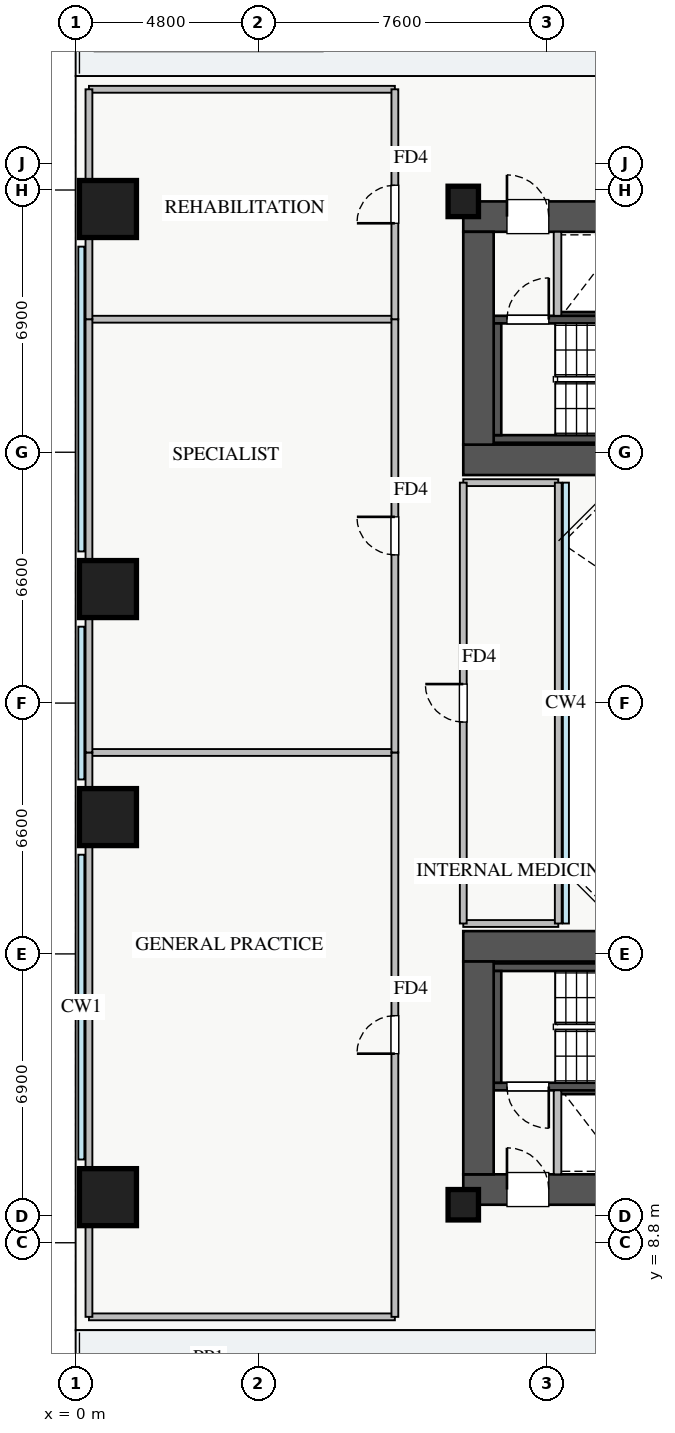
"""IFC4 building model, lengths in metres.
Left out: names, types, materials, properties, quantities, classifications, styles, units other than length and angle.
Written with IfcOpenShell. Run it as: python <this file> out.ifc"""

import sys

from ifc_helpers import new_model, si_unit, direction, frame, frame_2d, origin, origin_2d, place, context, subcontext, project, spatial, rectangle, extrude, source, transform, mapped, element, fill, save


model = new_model("IFC4")
c1 = context("Model", 3, precision=1e-05, world=origin(), true_north=direction((0.0, 1.0)))
c2 = subcontext(c1, "Body", "Model", "MODEL_VIEW")
j1 = project(units=[si_unit("LENGTHUNIT", "METRE"), si_unit("PLANEANGLEUNIT", "RADIAN")], contexts=[c1])
p1 = place(None, origin())
s1 = spatial("IfcSite", under=j1, at=p1, CompositionType="ELEMENT")
p2 = place(p1, origin())
s2 = spatial("IfcBuilding", under=s1, at=p2, CompositionType="ELEMENT")
p3 = place(p2, frame((0.0, 0.0, 18.2)))
s3 = spatial("IfcBuildingStorey", under=s2, at=p3, CompositionType="ELEMENT", Elevation=18.2)
for number, where, z_axis, x_axis in (
    (1, (12.68, 33.2, 0.0), (0.0, 0.0, 1.0), (1.0, 0.0, 0.0)),
    (2, (12.68, 12.8, 0.0), (0.0, 0.0, 1.0), (1.0, 0.0, 0.0)),
):
    element("IfcWall", number, at=place(p3, frame(where, z_axis=z_axis, x_axis=x_axis)), inside=s3, PredefinedType="SHEAR", context=c2, shape_type="SweptSolid", body=[
        extrude(rectangle(XDim=1.94, YDim=0.18, at=frame_2d((0.97, 0.0))), origin(), (0.0, 0.0, 1.0), 4.62),
    ])
p4 = place(p3, frame((11.0, 29.95, 0.0), z_axis=(0.0, 0.0, 1.0), x_axis=(1.0, 0.0, 0.0)))
e3 = element("IfcWall", 3, at=p4, inside=s3, PredefinedType="SHEAR", context=c2, shape_type="SweptSolid", body=[
    extrude(rectangle(XDim=7.15, YDim=0.2, at=frame_2d((3.575, 0.0))), origin(), (0.0, 0.0, 1.0), 4.8),
])
p5 = place(p3, frame((11.0, 33.09, 0.0), z_axis=(0.0, 0.0, 1.0), x_axis=(1.0, 0.0, 0.0)))
e4 = element("IfcWall", 4, at=p5, inside=s3, PredefinedType="SHEAR", context=c2, shape_type="SweptSolid", body=[
    extrude(rectangle(XDim=7.15, YDim=0.2, at=frame_2d((3.575, 0.0))), origin(), (0.0, 0.0, 1.0), 4.8),
])
p6 = place(p5, frame((0.35, 0.0, 0.0)))
e5 = element("IfcOpeningElement", 5, at=p6, cuts=e4, PredefinedType="OPENING", context=c2, shape_type="SweptSolid", body=[
    extrude(rectangle(XDim=1.1, YDim=2.05, at=frame_2d((0.55, 1.025))), frame((0.0, 0.11, 0.0), z_axis=(0.0, -1.0, 0.0), x_axis=(1.0, 0.0, 0.0)), (0.0, 0.0, 1.0), 0.22),
])
p7 = place(p3, frame((11.1, 30.05, 0.0), z_axis=(0.0, 0.0, 1.0), x_axis=(0.0, 1.0, 0.0)))
e6 = element("IfcWall", 6, at=p7, inside=s3, PredefinedType="SHEAR", context=c2, shape_type="SweptSolid", body=[
    extrude(rectangle(XDim=2.94, YDim=0.2, at=frame_2d((1.47, 0.0))), origin(), (0.0, 0.0, 1.0), 4.8),
])
p8 = place(p3, frame((11.0, 12.91, 0.0), z_axis=(0.0, 0.0, 1.0), x_axis=(1.0, 0.0, 0.0)))
e7 = element("IfcWall", 7, at=p8, inside=s3, PredefinedType="SHEAR", context=c2, shape_type="SweptSolid", body=[
    extrude(rectangle(XDim=7.15, YDim=0.2, at=frame_2d((3.575, 0.0))), origin(), (0.0, 0.0, 1.0), 4.8),
])
p9 = place(p8, frame((0.35, 0.0, 0.0)))
e8 = element("IfcOpeningElement", 8, at=p9, cuts=e7, PredefinedType="OPENING", context=c2, shape_type="SweptSolid", body=[
    extrude(rectangle(XDim=1.1, YDim=2.05, at=frame_2d((0.55, 1.025))), frame((0.0, 0.11, 0.0), z_axis=(0.0, -1.0, 0.0), x_axis=(1.0, 0.0, 0.0)), (0.0, 0.0, 1.0), 0.22),
])
p10 = place(p3, frame((11.0, 16.05, 0.0), z_axis=(0.0, 0.0, 1.0), x_axis=(1.0, 0.0, 0.0)))
e9 = element("IfcWall", 9, at=p10, inside=s3, PredefinedType="SHEAR", context=c2, shape_type="SweptSolid", body=[
    extrude(rectangle(XDim=7.15, YDim=0.2, at=frame_2d((3.575, 0.0))), origin(), (0.0, 0.0, 1.0), 4.8),
])
p11 = place(p3, frame((11.1, 13.01, 0.0), z_axis=(0.0, 0.0, 1.0), x_axis=(0.0, 1.0, 0.0)))
e10 = element("IfcWall", 10, at=p11, inside=s3, PredefinedType="SHEAR", context=c2, shape_type="SweptSolid", body=[
    extrude(rectangle(XDim=2.94, YDim=0.2, at=frame_2d((1.47, 0.0))), origin(), (0.0, 0.0, 1.0), 4.8),
])
p12 = place(p3, frame((10.2, 29.4, 0.0), z_axis=(0.0, 0.0, 1.0), x_axis=(1.0, 0.0, 0.0)))
e11 = element("IfcWall", 11, at=p12, inside=s3, PredefinedType="SHEAR", context=c2, shape_type="SweptSolid", body=[
    extrude(rectangle(XDim=17.6, YDim=0.8, at=frame_2d((8.8, 0.0))), origin(), (0.0, 0.0, 1.0), 4.8),
])
p13 = place(p3, frame((10.2, 35.8, 0.0), z_axis=(0.0, 0.0, 1.0), x_axis=(1.0, 0.0, 0.0)))
e12 = element("IfcWall", 12, at=p13, inside=s3, PredefinedType="SHEAR", context=c2, shape_type="SweptSolid", body=[
    extrude(rectangle(XDim=17.6, YDim=0.8, at=frame_2d((8.8, 0.0))), origin(), (0.0, 0.0, 1.0), 4.8),
])
p14 = place(p13, frame((1.15, 0.0, 0.0)))
e13 = element("IfcOpeningElement", 13, at=p14, cuts=e12, PredefinedType="OPENING", context=c2, shape_type="SweptSolid", body=[
    extrude(rectangle(XDim=1.1, YDim=2.05, at=frame_2d((0.55, 1.025))), frame((0.0, 0.41, 0.0), z_axis=(0.0, -1.0, 0.0), x_axis=(1.0, 0.0, 0.0)), (0.0, 0.0, 1.0), 0.82),
])
p15 = place(p13, frame((8.3, 0.0, 0.0)))
e14 = element("IfcOpeningElement", 14, at=p15, cuts=e12, PredefinedType="OPENING", context=c2, shape_type="SweptSolid", body=[
    extrude(rectangle(XDim=1.1, YDim=2.05, at=frame_2d((0.55, 1.025))), frame((0.0, 0.41, 0.0), z_axis=(0.0, -1.0, 0.0), x_axis=(1.0, 0.0, 0.0)), (0.0, 0.0, 1.0), 0.82),
])
p16 = place(p13, frame((10.05, 0.0, 0.0)))
e15 = element("IfcOpeningElement", 15, at=p16, cuts=e12, PredefinedType="OPENING", context=c2, shape_type="SweptSolid", body=[
    extrude(rectangle(XDim=1.1, YDim=2.05, at=frame_2d((0.55, 1.025))), frame((0.0, 0.41, 0.0), z_axis=(0.0, -1.0, 0.0), x_axis=(1.0, 0.0, 0.0)), (0.0, 0.0, 1.0), 0.82),
])
p17 = place(p13, frame((14.74, 0.0, 0.0)))
e16 = element("IfcOpeningElement", 16, at=p17, cuts=e12, PredefinedType="OPENING", context=c2, shape_type="SweptSolid", body=[
    extrude(rectangle(XDim=1.0, YDim=2.05, at=frame_2d((0.5, 1.025))), frame((0.0, 0.41, 0.0), z_axis=(0.0, -1.0, 0.0), x_axis=(1.0, 0.0, 0.0)), (0.0, 0.0, 1.0), 0.82),
])
p18 = place(p13, frame((11.835, 0.0, 0.0)))
e17 = element("IfcOpeningElement", 17, at=p18, cuts=e12, PredefinedType="OPENING", context=c2, shape_type="SweptSolid", body=[
    extrude(rectangle(XDim=1.0, YDim=2.05, at=frame_2d((0.5, 1.025))), frame((0.0, 0.41, 0.0), z_axis=(0.0, -1.0, 0.0), x_axis=(1.0, 0.0, 0.0)), (0.0, 0.0, 1.0), 0.82),
])
p19 = place(p13, frame((13.37, 0.0, 0.0)))
e18 = element("IfcOpeningElement", 18, at=p19, cuts=e12, PredefinedType="OPENING", context=c2, shape_type="SweptSolid", body=[
    extrude(rectangle(XDim=1.0, YDim=2.05, at=frame_2d((0.5, 1.025))), frame((0.0, 0.41, 0.0), z_axis=(0.0, -1.0, 0.0), x_axis=(1.0, 0.0, 0.0)), (0.0, 0.0, 1.0), 0.82),
])
p20 = place(p3, frame((10.6, 29.8, 0.0), z_axis=(0.0, 0.0, 1.0), x_axis=(0.0, 1.0, 0.0)))
e19 = element("IfcWall", 19, at=p20, inside=s3, PredefinedType="SHEAR", context=c2, shape_type="SweptSolid", body=[
    extrude(rectangle(XDim=5.6, YDim=0.8, at=frame_2d((2.8, 0.0))), origin(), (0.0, 0.0, 1.0), 4.8),
])
p21 = place(p3, frame((10.2, 10.2, 0.0), z_axis=(0.0, 0.0, 1.0), x_axis=(1.0, 0.0, 0.0)))
e20 = element("IfcWall", 20, at=p21, inside=s3, PredefinedType="SHEAR", context=c2, shape_type="SweptSolid", body=[
    extrude(rectangle(XDim=17.6, YDim=0.8, at=frame_2d((8.8, 0.0))), origin(), (0.0, 0.0, 1.0), 4.8),
])
p22 = place(p21, frame((1.15, 0.0, 0.0)))
e21 = element("IfcOpeningElement", 21, at=p22, cuts=e20, PredefinedType="OPENING", context=c2, shape_type="SweptSolid", body=[
    extrude(rectangle(XDim=1.1, YDim=2.05, at=frame_2d((0.55, 1.025))), frame((0.0, 0.41, 0.0), z_axis=(0.0, -1.0, 0.0), x_axis=(1.0, 0.0, 0.0)), (0.0, 0.0, 1.0), 0.82),
])
p23 = place(p21, frame((8.3, 0.0, 0.0)))
e22 = element("IfcOpeningElement", 22, at=p23, cuts=e20, PredefinedType="OPENING", context=c2, shape_type="SweptSolid", body=[
    extrude(rectangle(XDim=1.1, YDim=2.05, at=frame_2d((0.55, 1.025))), frame((0.0, 0.41, 0.0), z_axis=(0.0, -1.0, 0.0), x_axis=(1.0, 0.0, 0.0)), (0.0, 0.0, 1.0), 0.82),
])
p24 = place(p21, frame((10.05, 0.0, 0.0)))
e23 = element("IfcOpeningElement", 23, at=p24, cuts=e20, PredefinedType="OPENING", context=c2, shape_type="SweptSolid", body=[
    extrude(rectangle(XDim=1.1, YDim=2.05, at=frame_2d((0.55, 1.025))), frame((0.0, 0.41, 0.0), z_axis=(0.0, -1.0, 0.0), x_axis=(1.0, 0.0, 0.0)), (0.0, 0.0, 1.0), 0.82),
])
p25 = place(p21, frame((14.74, 0.0, 0.0)))
e24 = element("IfcOpeningElement", 24, at=p25, cuts=e20, PredefinedType="OPENING", context=c2, shape_type="SweptSolid", body=[
    extrude(rectangle(XDim=1.0, YDim=2.05, at=frame_2d((0.5, 1.025))), frame((0.0, 0.41, 0.0), z_axis=(0.0, -1.0, 0.0), x_axis=(1.0, 0.0, 0.0)), (0.0, 0.0, 1.0), 0.82),
])
p26 = place(p21, frame((12.585, 0.0, 0.0)))
e25 = element("IfcOpeningElement", 25, at=p26, cuts=e20, PredefinedType="OPENING", context=c2, shape_type="SweptSolid", body=[
    extrude(rectangle(XDim=1.0, YDim=2.05, at=frame_2d((0.5, 1.025))), frame((0.0, 0.41, 0.0), z_axis=(0.0, -1.0, 0.0), x_axis=(1.0, 0.0, 0.0)), (0.0, 0.0, 1.0), 0.82),
])
p27 = place(p3, frame((10.2, 16.6, 0.0), z_axis=(0.0, 0.0, 1.0), x_axis=(1.0, 0.0, 0.0)))
e26 = element("IfcWall", 26, at=p27, inside=s3, PredefinedType="SHEAR", context=c2, shape_type="SweptSolid", body=[
    extrude(rectangle(XDim=17.6, YDim=0.8, at=frame_2d((8.8, 0.0))), origin(), (0.0, 0.0, 1.0), 4.8),
])
p28 = place(p3, frame((10.6, 10.6, 0.0), z_axis=(0.0, 0.0, 1.0), x_axis=(0.0, 1.0, 0.0)))
e27 = element("IfcWall", 27, at=p28, inside=s3, PredefinedType="SHEAR", context=c2, shape_type="SweptSolid", body=[
    extrude(rectangle(XDim=5.6, YDim=0.8, at=frame_2d((2.8, 0.0))), origin(), (0.0, 0.0, 1.0), 4.8),
])
m1 = source(origin(), c2, "Body", "SweptSolid", [
    extrude(rectangle(XDim=1.5, YDim=1.5, at=origin_2d()), origin(), (0.0, 0.0, 1.0), 4.8),
])
for number, where, z_axis, x_axis in (
    (28, (0.85, 36.0, 0.0), (0.0, 0.0, 1.0), (1.0, 0.0, 0.0)),
    (29, (0.85, 26.0, 0.0), (0.0, 0.0, 1.0), (1.0, 0.0, 0.0)),
    (30, (0.85, 20.0, 0.0), (0.0, 0.0, 1.0), (1.0, 0.0, 0.0)),
    (31, (0.85, 10.0, 0.0), (0.0, 0.0, 1.0), (1.0, 0.0, 0.0)),
):
    element("IfcColumn", number, at=place(p3, frame(where, z_axis=z_axis, x_axis=x_axis)), inside=s3, PredefinedType="COLUMN", context=c2, shape_type="MappedRepresentation", body=[
        mapped(m1, transform((0.0, 0.0, 0.0), x_axis=(1.0, 0.0, 0.0), y_axis=(0.0, 1.0, 0.0), z_axis=(0.0, 0.0, 1.0), scale=1.0)),
    ])
m2 = source(origin(), c2, "Body", "SweptSolid", [
    extrude(rectangle(XDim=0.8, YDim=0.8, at=origin_2d()), origin(), (0.0, 0.0, 1.0), 4.8),
])
for number, where, z_axis, x_axis in (
    (32, (10.2, 36.2, 0.0), (0.0, 0.0, 1.0), (1.0, 0.0, 0.0)),
    (33, (10.2, 9.8, 0.0), (0.0, 0.0, 1.0), (1.0, 0.0, 0.0)),
):
    element("IfcColumn", number, at=place(p3, frame(where, z_axis=z_axis, x_axis=x_axis)), inside=s3, PredefinedType="PILASTER", context=c2, shape_type="MappedRepresentation", body=[
        mapped(m2, transform((0.0, 0.0, 0.0), x_axis=(1.0, 0.0, 0.0), y_axis=(0.0, 1.0, 0.0), z_axis=(0.0, 0.0, 1.0), scale=1.0)),
    ])
for number, where, z_axis, x_axis in (
    (34, (12.68, 33.19, 0.0), (0.0, 0.0, 1.0), (0.0, 1.0, 0.0)),
    (35, (12.68, 10.6, 0.0), (0.0, 0.0, 1.0), (0.0, 1.0, 0.0)),
):
    element("IfcWall", number, at=place(p3, frame(where, z_axis=z_axis, x_axis=x_axis)), inside=s3, PredefinedType="PARTITIONING", context=c2, shape_type="SweptSolid", body=[
        extrude(rectangle(XDim=2.21, YDim=0.2, at=frame_2d((1.105, 0.0))), origin(), (0.0, 0.0, 1.0), 4.62),
    ])
for number, where, z_axis, x_axis in (
    (36, (0.35, 6.85, 0.0), (0.0, 0.0, 1.0), (1.0, 0.0, 0.0)),
    (37, (0.35, 21.7, 0.0), (0.0, 0.0, 1.0), (1.0, 0.0, 0.0)),
):
    element("IfcWall", number, at=place(p3, frame(where, z_axis=z_axis, x_axis=x_axis)), inside=s3, PredefinedType="PARTITIONING", context=c2, shape_type="SweptSolid", body=[
        extrude(rectangle(XDim=8.05, YDim=0.18, at=frame_2d((4.025, 0.0))), origin(), (0.0, 0.0, 1.0), 4.62),
    ])
p29 = place(p3, frame((0.35, 6.85, 0.0), z_axis=(0.0, 0.0, 1.0), x_axis=(0.0, 1.0, 0.0)))
e38 = element("IfcWall", 38, at=p29, inside=s3, PredefinedType="PARTITIONING", context=c2, shape_type="SweptSolid", body=[
    extrude(rectangle(XDim=14.85, YDim=0.18, at=frame_2d((7.425, 0.0))), origin(), (0.0, 0.0, 1.0), 4.62),
])
p30 = place(p3, frame((8.4, 6.85, 0.0), z_axis=(0.0, 0.0, 1.0), x_axis=(0.0, 1.0, 0.0)))
e39 = element("IfcWall", 39, at=p30, inside=s3, PredefinedType="PARTITIONING", context=c2, shape_type="SweptSolid", body=[
    extrude(rectangle(XDim=14.85, YDim=0.18, at=frame_2d((7.425, 0.0))), origin(), (0.0, 0.0, 1.0), 4.62),
])
p31 = place(p30, frame((6.925, 0.0, 0.0)))
e40 = element("IfcOpeningElement", 40, at=p31, cuts=e39, PredefinedType="OPENING", context=c2, shape_type="SweptSolid", body=[
    extrude(rectangle(XDim=1.0, YDim=2.05, at=frame_2d((0.5, 1.025))), frame((0.0, 0.1, 0.0), z_axis=(0.0, -1.0, 0.0), x_axis=(1.0, 0.0, 0.0)), (0.0, 0.0, 1.0), 0.2),
])
p32 = place(p3, frame((0.35, 33.1, 0.0), z_axis=(0.0, 0.0, 1.0), x_axis=(1.0, 0.0, 0.0)))
e41 = element("IfcWall", 41, at=p32, inside=s3, PredefinedType="PARTITIONING", context=c2, shape_type="SweptSolid", body=[
    extrude(rectangle(XDim=8.05, YDim=0.18, at=frame_2d((4.025, 0.0))), origin(), (0.0, 0.0, 1.0), 4.62),
])
p33 = place(p3, frame((0.35, 21.7, 0.0), z_axis=(0.0, 0.0, 1.0), x_axis=(0.0, 1.0, 0.0)))
e42 = element("IfcWall", 42, at=p33, inside=s3, PredefinedType="PARTITIONING", context=c2, shape_type="SweptSolid", body=[
    extrude(rectangle(XDim=11.4, YDim=0.18, at=frame_2d((5.7, 0.0))), origin(), (0.0, 0.0, 1.0), 4.62),
])
p34 = place(p3, frame((8.4, 21.7, 0.0), z_axis=(0.0, 0.0, 1.0), x_axis=(0.0, 1.0, 0.0)))
e43 = element("IfcWall", 43, at=p34, inside=s3, PredefinedType="PARTITIONING", context=c2, shape_type="SweptSolid", body=[
    extrude(rectangle(XDim=11.4, YDim=0.18, at=frame_2d((5.7, 0.0))), origin(), (0.0, 0.0, 1.0), 4.62),
])
p35 = place(p34, frame((5.2, 0.0, 0.0)))
e44 = element("IfcOpeningElement", 44, at=p35, cuts=e43, PredefinedType="OPENING", context=c2, shape_type="SweptSolid", body=[
    extrude(rectangle(XDim=1.0, YDim=2.05, at=frame_2d((0.5, 1.025))), frame((0.0, 0.1, 0.0), z_axis=(0.0, -1.0, 0.0), x_axis=(1.0, 0.0, 0.0)), (0.0, 0.0, 1.0), 0.2),
])
p36 = place(p3, frame((0.35, 39.15, 0.0), z_axis=(0.0, 0.0, 1.0), x_axis=(1.0, 0.0, 0.0)))
e45 = element("IfcWall", 45, at=p36, inside=s3, PredefinedType="PARTITIONING", context=c2, shape_type="SweptSolid", body=[
    extrude(rectangle(XDim=8.05, YDim=0.18, at=frame_2d((4.025, 0.0))), origin(), (0.0, 0.0, 1.0), 4.62),
])
p37 = place(p3, frame((0.35, 33.1, 0.0), z_axis=(0.0, 0.0, 1.0), x_axis=(0.0, 1.0, 0.0)))
e46 = element("IfcWall", 46, at=p37, inside=s3, PredefinedType="PARTITIONING", context=c2, shape_type="SweptSolid", body=[
    extrude(rectangle(XDim=6.05, YDim=0.18, at=frame_2d((3.025, 0.0))), origin(), (0.0, 0.0, 1.0), 4.62),
])
p38 = place(p3, frame((8.4, 33.1, 0.0), z_axis=(0.0, 0.0, 1.0), x_axis=(0.0, 1.0, 0.0)))
e47 = element("IfcWall", 47, at=p38, inside=s3, PredefinedType="PARTITIONING", context=c2, shape_type="SweptSolid", body=[
    extrude(rectangle(XDim=6.05, YDim=0.18, at=frame_2d((3.025, 0.0))), origin(), (0.0, 0.0, 1.0), 4.62),
])
p39 = place(p38, frame((2.525, 0.0, 0.0)))
e48 = element("IfcOpeningElement", 48, at=p39, cuts=e47, PredefinedType="OPENING", context=c2, shape_type="SweptSolid", body=[
    extrude(rectangle(XDim=1.0, YDim=2.05, at=frame_2d((0.5, 1.025))), frame((0.0, 0.1, 0.0), z_axis=(0.0, -1.0, 0.0), x_axis=(1.0, 0.0, 0.0)), (0.0, 0.0, 1.0), 0.2),
])
for number, where, z_axis, x_axis in (
    (49, (10.2, 17.2, 0.0), (0.0, 0.0, 1.0), (1.0, 0.0, 0.0)),
    (50, (10.2, 28.8, 0.0), (0.0, 0.0, 1.0), (1.0, 0.0, 0.0)),
):
    element("IfcWall", number, at=place(p3, frame(where, z_axis=z_axis, x_axis=x_axis)), inside=s3, PredefinedType="PARTITIONING", context=c2, shape_type="SweptSolid", body=[
        extrude(rectangle(XDim=2.5, YDim=0.18, at=frame_2d((1.25, 0.0))), origin(), (0.0, 0.0, 1.0), 4.62),
    ])
p40 = place(p3, frame((10.2, 17.2, 0.0), z_axis=(0.0, 0.0, 1.0), x_axis=(0.0, 1.0, 0.0)))
e51 = element("IfcWall", 51, at=p40, inside=s3, PredefinedType="PARTITIONING", context=c2, shape_type="SweptSolid", body=[
    extrude(rectangle(XDim=11.6, YDim=0.18, at=frame_2d((5.8, 0.0))), origin(), (0.0, 0.0, 1.0), 4.62),
])
p41 = place(p40, frame((5.3, 0.0, 0.0)))
e52 = element("IfcOpeningElement", 52, at=p41, cuts=e51, PredefinedType="OPENING", context=c2, shape_type="SweptSolid", body=[
    extrude(rectangle(XDim=1.0, YDim=2.05, at=frame_2d((0.5, 1.025))), frame((0.0, 0.1, 0.0), z_axis=(0.0, -1.0, 0.0), x_axis=(1.0, 0.0, 0.0)), (0.0, 0.0, 1.0), 0.2),
])
p42 = place(p3, frame((12.7, 17.2, 0.0), z_axis=(0.0, 0.0, 1.0), x_axis=(0.0, 1.0, 0.0)))
e53 = element("IfcWall", 53, at=p42, inside=s3, PredefinedType="PARTITIONING", context=c2, shape_type="SweptSolid", body=[
    extrude(rectangle(XDim=11.6, YDim=0.18, at=frame_2d((5.8, 0.0))), origin(), (0.0, 0.0, 1.0), 4.62),
])
m3 = source(origin(), c2, "Body", "SweptSolid", [
    extrude(rectangle(XDim=1.1, YDim=2.05, at=frame_2d((0.55, 1.025))), frame((0.0, 0.025, 0.0), z_axis=(0.0, -1.0, 0.0), x_axis=(1.0, 0.0, 0.0)), (0.0, 0.0, 1.0), 0.05),
])
p43 = place(p14, origin())
e54 = element("IfcDoor", 54, at=p43, inside=s3, OperationType="SINGLE_SWING_LEFT", PredefinedType="DOOR", context=c2, shape_type="MappedRepresentation", body=[
    mapped(m3, transform((0.0, 0.0, 0.0), x_axis=(1.0, 0.0, 0.0), y_axis=(0.0, 1.0, 0.0), z_axis=(0.0, 0.0, 1.0), scale=1.0)),
])
fill(e13, e54)
p44 = place(p6, origin())
e55 = element("IfcDoor", 55, at=p44, inside=s3, OperationType="SINGLE_SWING_RIGHT", PredefinedType="DOOR", context=c2, shape_type="MappedRepresentation", body=[
    mapped(m3, transform((0.0, 0.0, 0.0), x_axis=(1.0, 0.0, 0.0), y_axis=(0.0, 1.0, 0.0), z_axis=(0.0, 0.0, 1.0), scale=1.0)),
])
fill(e5, e55)
p45 = place(p22, origin())
e56 = element("IfcDoor", 56, at=p45, inside=s3, OperationType="SINGLE_SWING_LEFT", PredefinedType="DOOR", context=c2, shape_type="MappedRepresentation", body=[
    mapped(m3, transform((0.0, 0.0, 0.0), x_axis=(1.0, 0.0, 0.0), y_axis=(0.0, 1.0, 0.0), z_axis=(0.0, 0.0, 1.0), scale=1.0)),
])
fill(e21, e56)
p46 = place(p9, frame((1.1, 0.0, 0.0), z_axis=(0.0, 0.0, 1.0), x_axis=(-1.0, 0.0, 0.0)))
e57 = element("IfcDoor", 57, at=p46, inside=s3, OperationType="SINGLE_SWING_RIGHT", PredefinedType="DOOR", context=c2, shape_type="MappedRepresentation", body=[
    mapped(m3, transform((0.0, 0.0, 0.0), x_axis=(1.0, 0.0, 0.0), y_axis=(0.0, 1.0, 0.0), z_axis=(0.0, 0.0, 1.0), scale=1.0)),
])
fill(e8, e57)
m4 = source(origin(), c2, "Body", "SweptSolid", [
    extrude(rectangle(XDim=1.0, YDim=2.05, at=frame_2d((0.5, 1.025))), frame((0.0, 0.025, 0.0), z_axis=(0.0, -1.0, 0.0), x_axis=(1.0, 0.0, 0.0)), (0.0, 0.0, 1.0), 0.05),
])
p47 = place(p31, origin())
e58 = element("IfcDoor", 58, at=p47, inside=s3, OperationType="SINGLE_SWING_LEFT", PredefinedType="DOOR", context=c2, shape_type="MappedRepresentation", body=[
    mapped(m4, transform((0.0, 0.0, 0.0), x_axis=(1.0, 0.0, 0.0), y_axis=(0.0, 1.0, 0.0), z_axis=(0.0, 0.0, 1.0), scale=1.0)),
])
fill(e40, e58)
p48 = place(p35, origin())
e59 = element("IfcDoor", 59, at=p48, inside=s3, OperationType="SINGLE_SWING_RIGHT", PredefinedType="DOOR", context=c2, shape_type="MappedRepresentation", body=[
    mapped(m4, transform((0.0, 0.0, 0.0), x_axis=(1.0, 0.0, 0.0), y_axis=(0.0, 1.0, 0.0), z_axis=(0.0, 0.0, 1.0), scale=1.0)),
])
fill(e44, e59)
p49 = place(p39, origin())
e60 = element("IfcDoor", 60, at=p49, inside=s3, OperationType="SINGLE_SWING_LEFT", PredefinedType="DOOR", context=c2, shape_type="MappedRepresentation", body=[
    mapped(m4, transform((0.0, 0.0, 0.0), x_axis=(1.0, 0.0, 0.0), y_axis=(0.0, 1.0, 0.0), z_axis=(0.0, 0.0, 1.0), scale=1.0)),
])
fill(e48, e60)
p50 = place(p41, origin())
e61 = element("IfcDoor", 61, at=p50, inside=s3, OperationType="SINGLE_SWING_RIGHT", PredefinedType="DOOR", context=c2, shape_type="MappedRepresentation", body=[
    mapped(m4, transform((0.0, 0.0, 0.0), x_axis=(1.0, 0.0, 0.0), y_axis=(0.0, 1.0, 0.0), z_axis=(0.0, 0.0, 1.0), scale=1.0)),
])
fill(e52, e61)
save(model, sys.argv[1])
